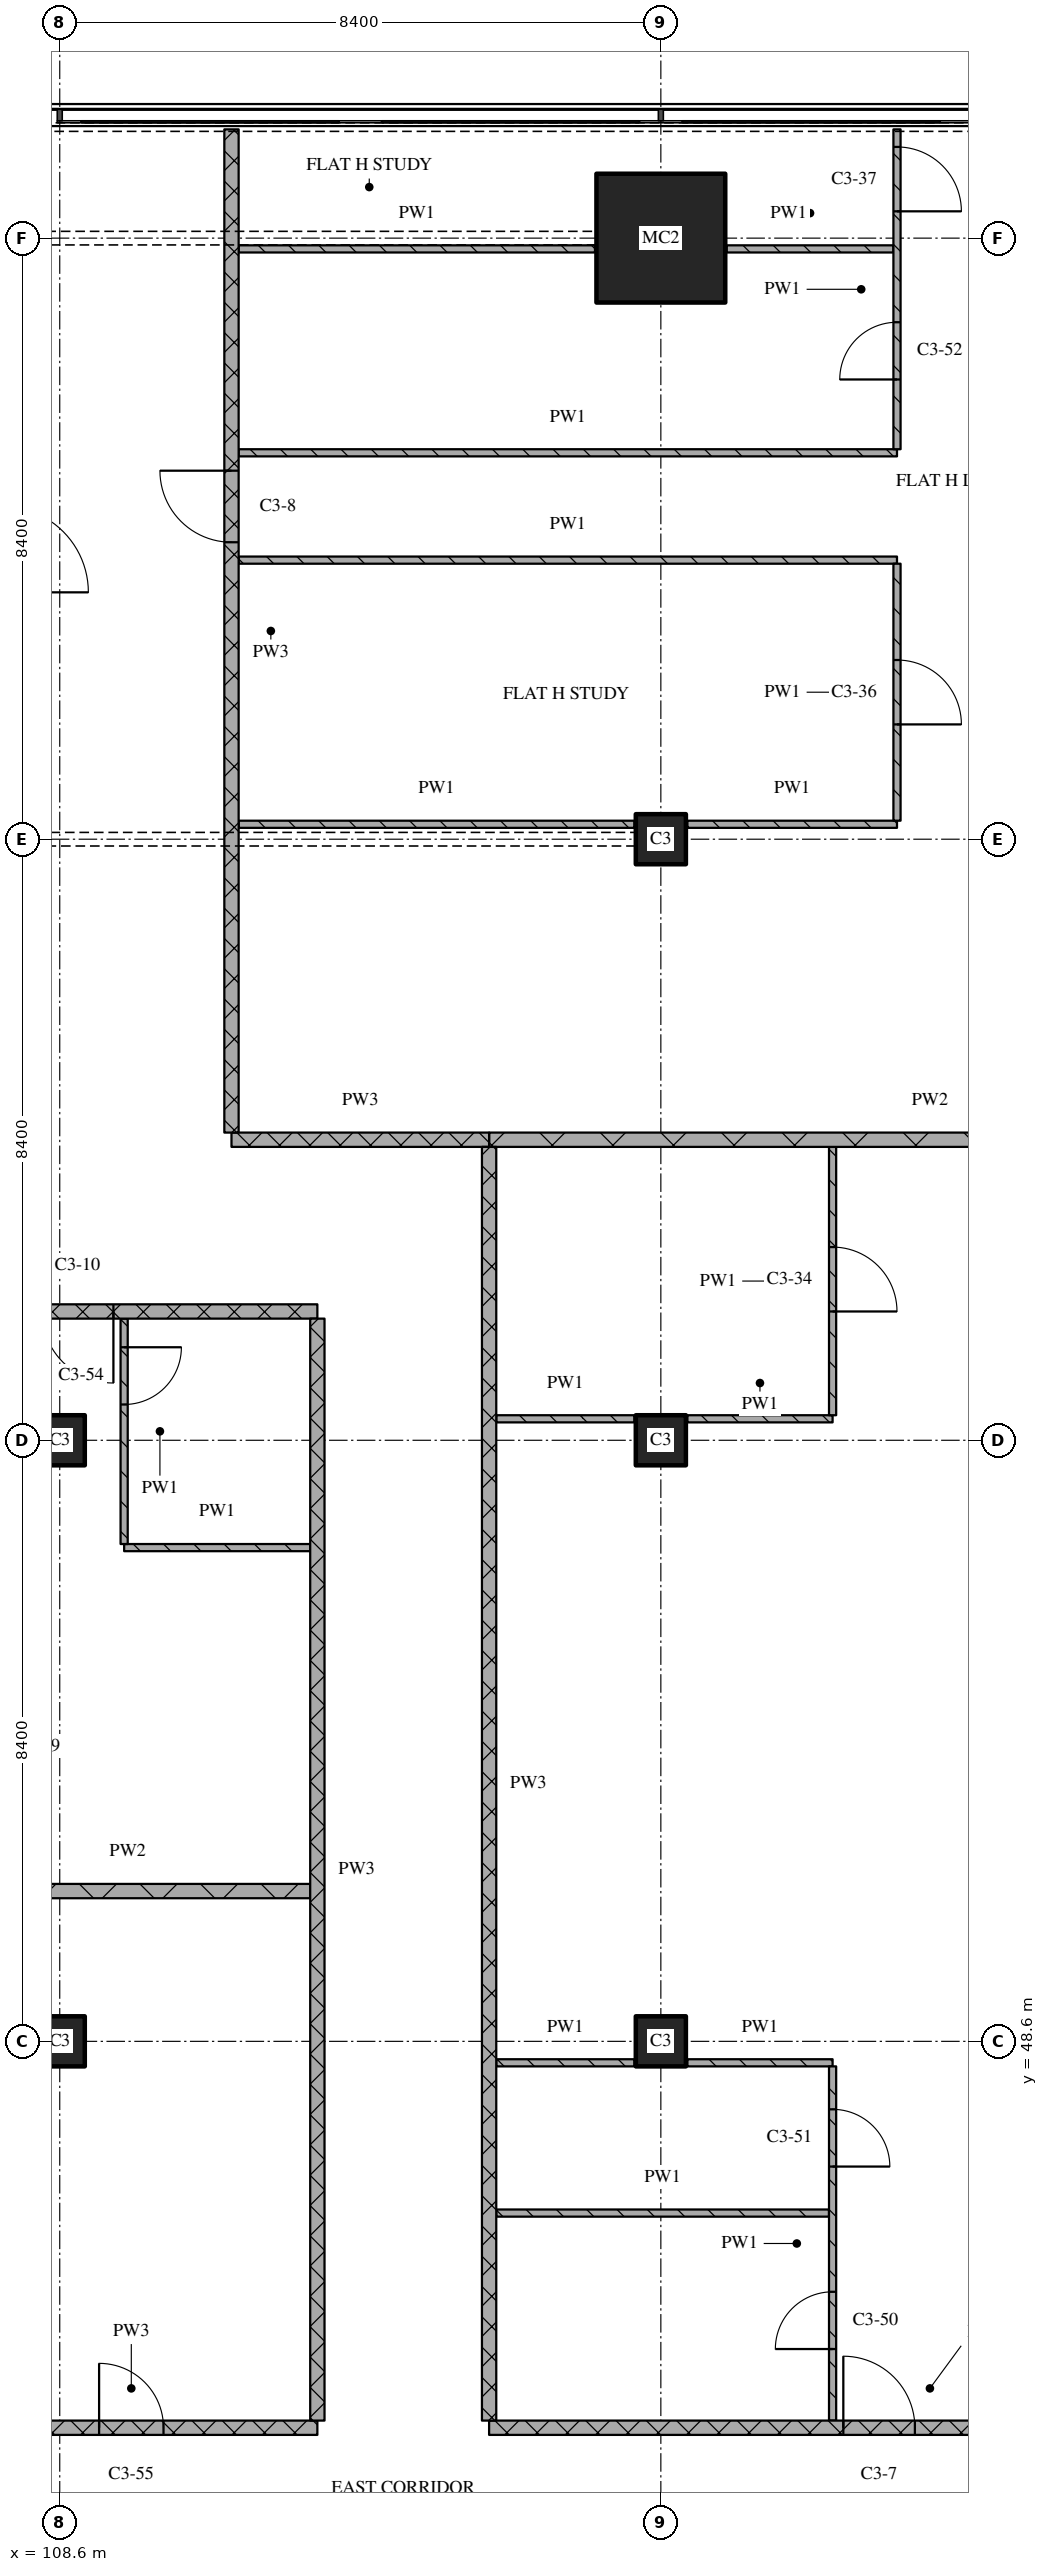
"""IFC4 building model, lengths in metres.
Left out: names, types, materials, properties, quantities, classifications, styles, units other than length and angle.
Written with IfcOpenShell. Run it as: python <this file> out.ifc"""

import sys

from ifc_helpers import new_model, si_unit, direction, frame, frame_2d, origin, origin_2d, place, context, subcontext, project, spatial, rectangle, extrude, element, fill, save


model = new_model("IFC4")
c1 = context("Model", 3, precision=1e-05, world=origin(), true_north=direction((0.0, 1.0)))
c2 = subcontext(c1, "Body", "Model", "MODEL_VIEW")
j1 = project(units=[si_unit("LENGTHUNIT", "METRE"), si_unit("PLANEANGLEUNIT", "RADIAN")], contexts=[c1])
p1 = place(None, origin())
s1 = spatial("IfcSite", under=j1, at=p1, CompositionType="ELEMENT")
p2 = place(p1, origin())
s2 = spatial("IfcBuilding", under=s1, at=p2, CompositionType="ELEMENT")
p3 = place(p2, frame((0.0, 0.0, 176.25)))
s3 = spatial("IfcBuildingStorey", under=s2, at=p3, CompositionType="ELEMENT", Elevation=176.25)
for number, where, z_axis, x_axis in (
    (1, (108.6, 48.6, 0.0), (0.0, 0.0, 1.0), (1.0, 0.0, 0.0)),
    (2, (108.6, 57.0, 0.0), (0.0, 0.0, 1.0), (1.0, 0.0, 0.0)),
    (3, (117.0, 48.6, 0.0), (0.0, 0.0, 1.0), (1.0, 0.0, 0.0)),
    (4, (117.0, 57.0, 0.0), (0.0, 0.0, 1.0), (1.0, 0.0, 0.0)),
    (5, (117.0, 65.4, 0.0), (0.0, 0.0, 1.0), (1.0, 0.0, 0.0)),
):
    element("IfcColumn", number, at=place(p3, frame(where, z_axis=z_axis, x_axis=x_axis)), inside=s3, PredefinedType="COLUMN", context=c2, shape_type="SweptSolid", body=[
        extrude(rectangle(XDim=0.7, YDim=0.7, at=origin_2d()), origin(), (0.0, 0.0, 1.0), 3.6),
    ])
p4 = place(p3, frame((117.0, 73.8, 0.0), z_axis=(0.0, 0.0, 1.0), x_axis=(1.0, 0.0, 0.0)))
e6 = element("IfcColumn", 6, at=p4, inside=s3, PredefinedType="COLUMN", context=c2, shape_type="SweptSolid", body=[
    extrude(rectangle(XDim=1.8, YDim=1.8, at=origin_2d()), origin(), (0.0, 0.0, 1.0), 3.6),
])
p5 = place(p3, frame((107.0, 43.2, 0.0), z_axis=(0.0, 0.0, 1.0), x_axis=(1.0, 0.0, 0.0)))
e7 = element("IfcWall", 7, at=p5, inside=s3, PredefinedType="PARTITIONING", context=c2, shape_type="SweptSolid", body=[
    extrude(rectangle(XDim=5.2, YDim=0.2, at=frame_2d((2.6, 0.0))), origin(), (0.0, 0.0, 1.0), 3.32),
])
p6 = place(p5, frame((2.15, 0.0, 0.0)))
e8 = element("IfcOpeningElement", 8, at=p6, cuts=e7, PredefinedType="OPENING", context=c2, shape_type="SweptSolid", body=[
    extrude(rectangle(XDim=0.9, YDim=2.1, at=frame_2d((0.45, 1.05))), frame((0.0, 0.11, 0.0), z_axis=(0.0, -1.0, 0.0), x_axis=(1.0, 0.0, 0.0)), (0.0, 0.0, 1.0), 0.22),
])
p7 = place(p3, frame((114.6, 43.2, 0.0), z_axis=(0.0, 0.0, 1.0), x_axis=(1.0, 0.0, 0.0)))
e9 = element("IfcWall", 9, at=p7, inside=s3, PredefinedType="PARTITIONING", context=c2, shape_type="SweptSolid", body=[
    extrude(rectangle(XDim=12.32, YDim=0.2, at=frame_2d((6.16, 0.0))), origin(), (0.0, 0.0, 1.0), 3.32),
])
p8 = place(p7, frame((4.95, 0.0, 0.0)))
e10 = element("IfcOpeningElement", 10, at=p8, cuts=e9, PredefinedType="OPENING", context=c2, shape_type="SweptSolid", body=[
    extrude(rectangle(XDim=1.0, YDim=2.1, at=frame_2d((0.5, 1.05))), frame((0.0, 0.11, 0.0), z_axis=(0.0, -1.0, 0.0), x_axis=(1.0, 0.0, 0.0)), (0.0, 0.0, 1.0), 0.22),
])
p9 = place(p3, frame((114.7, 46.2, 0.0), z_axis=(0.0, 0.0, 1.0), x_axis=(1.0, 0.0, 0.0)))
e11 = element("IfcWall", 11, at=p9, inside=s3, PredefinedType="PARTITIONING", context=c2, shape_type="SweptSolid", body=[
    extrude(rectangle(XDim=4.65, YDim=0.1, at=frame_2d((2.325, 0.0))), origin(), (0.0, 0.0, 1.0), 3.32),
])
p10 = place(p3, frame((114.7, 48.3, 0.0), z_axis=(0.0, 0.0, 1.0), x_axis=(1.0, 0.0, 0.0)))
e12 = element("IfcWall", 12, at=p10, inside=s3, PredefinedType="PARTITIONING", context=c2, shape_type="SweptSolid", body=[
    extrude(rectangle(XDim=1.93, YDim=0.1, at=frame_2d((0.965, 0.0))), origin(), (0.0, 0.0, 1.0), 3.32),
])
p11 = place(p3, frame((117.37, 48.3, 0.0), z_axis=(0.0, 0.0, 1.0), x_axis=(1.0, 0.0, 0.0)))
e13 = element("IfcWall", 13, at=p11, inside=s3, PredefinedType="PARTITIONING", context=c2, shape_type="SweptSolid", body=[
    extrude(rectangle(XDim=2.03, YDim=0.1, at=frame_2d((1.015, 0.0))), origin(), (0.0, 0.0, 1.0), 3.32),
])
p12 = place(p3, frame((107.0, 50.7, 0.0), z_axis=(0.0, 0.0, 1.0), x_axis=(1.0, 0.0, 0.0)))
e14 = element("IfcWall", 14, at=p12, inside=s3, PredefinedType="PARTITIONING", context=c2, shape_type="SweptSolid", body=[
    extrude(rectangle(XDim=5.1, YDim=0.2, at=frame_2d((2.55, 0.0))), origin(), (0.0, 0.0, 1.0), 3.32),
])
p13 = place(p3, frame((109.5, 55.5, 0.0), z_axis=(0.0, 0.0, 1.0), x_axis=(1.0, 0.0, 0.0)))
e15 = element("IfcWall", 15, at=p13, inside=s3, PredefinedType="PARTITIONING", context=c2, shape_type="SweptSolid", body=[
    extrude(rectangle(XDim=2.6, YDim=0.1, at=frame_2d((1.3, 0.0))), origin(), (0.0, 0.0, 1.0), 3.32),
])
p14 = place(p3, frame((114.7, 57.3, 0.0), z_axis=(0.0, 0.0, 1.0), x_axis=(1.0, 0.0, 0.0)))
e16 = element("IfcWall", 16, at=p14, inside=s3, PredefinedType="PARTITIONING", context=c2, shape_type="SweptSolid", body=[
    extrude(rectangle(XDim=1.93, YDim=0.1, at=frame_2d((0.965, 0.0))), origin(), (0.0, 0.0, 1.0), 3.32),
])
p15 = place(p3, frame((117.37, 57.3, 0.0), z_axis=(0.0, 0.0, 1.0), x_axis=(1.0, 0.0, 0.0)))
e17 = element("IfcWall", 17, at=p15, inside=s3, PredefinedType="PARTITIONING", context=c2, shape_type="SweptSolid", body=[
    extrude(rectangle(XDim=2.03, YDim=0.1, at=frame_2d((1.015, 0.0))), origin(), (0.0, 0.0, 1.0), 3.32),
])
p16 = place(p3, frame((112.2, 58.8, 0.0), z_axis=(0.0, 0.0, 1.0), x_axis=(-1.0, 0.0, 0.0)))
e18 = element("IfcWall", 18, at=p16, inside=s3, PredefinedType="PARTITIONING", context=c2, shape_type="SweptSolid", body=[
    extrude(rectangle(XDim=10.8, YDim=0.2, at=frame_2d((5.4, 0.0))), origin(), (0.0, 0.0, 1.0), 3.32),
])
p17 = place(p16, frame((2.85, 0.0, 0.0)))
e19 = element("IfcOpeningElement", 19, at=p17, cuts=e18, PredefinedType="OPENING", context=c2, shape_type="SweptSolid", body=[
    extrude(rectangle(XDim=1.0, YDim=2.1, at=frame_2d((0.5, 1.05))), frame((0.0, 0.11, 0.0), z_axis=(0.0, -1.0, 0.0), x_axis=(1.0, 0.0, 0.0)), (0.0, 0.0, 1.0), 0.22),
])
p18 = place(p3, frame((111.0, 61.2, 0.0), z_axis=(0.0, 0.0, 1.0), x_axis=(1.0, 0.0, 0.0)))
e20 = element("IfcWall", 20, at=p18, inside=s3, PredefinedType="PARTITIONING", context=c2, shape_type="SweptSolid", body=[
    extrude(rectangle(XDim=3.6, YDim=0.2, at=frame_2d((1.8, 0.0))), origin(), (0.0, 0.0, 1.0), 3.32),
])
p19 = place(p3, frame((114.6, 61.2, 0.0), z_axis=(0.0, 0.0, 1.0), x_axis=(1.0, 0.0, 0.0)))
e21 = element("IfcWall", 21, at=p19, inside=s3, PredefinedType="PARTITIONING", context=c2, shape_type="SweptSolid", body=[
    extrude(rectangle(XDim=12.32, YDim=0.2, at=frame_2d((6.16, 0.0))), origin(), (0.0, 0.0, 1.0), 3.32),
])
p20 = place(p3, frame((111.1, 65.609, 0.0), z_axis=(0.0, 0.0, 1.0), x_axis=(1.0, 0.0, 0.0)))
e22 = element("IfcWall", 22, at=p20, inside=s3, PredefinedType="PARTITIONING", context=c2, shape_type="SweptSolid", body=[
    extrude(rectangle(XDim=5.53, YDim=0.1, at=frame_2d((2.765, 0.0))), origin(), (0.0, 0.0, 1.0), 3.32),
])
p21 = place(p3, frame((117.37, 65.609, 0.0), z_axis=(0.0, 0.0, 1.0), x_axis=(1.0, 0.0, 0.0)))
e23 = element("IfcWall", 23, at=p21, inside=s3, PredefinedType="PARTITIONING", context=c2, shape_type="SweptSolid", body=[
    extrude(rectangle(XDim=2.93, YDim=0.1, at=frame_2d((1.465, 0.0))), origin(), (0.0, 0.0, 1.0), 3.32),
])
for number, where, z_axis, x_axis in (
    (24, (111.1, 69.3, 0.0), (0.0, 0.0, 1.0), (1.0, 0.0, 0.0)),
    (25, (111.1, 70.8, 0.0), (0.0, 0.0, 1.0), (1.0, 0.0, 0.0)),
):
    element("IfcWall", number, at=place(p3, frame(where, z_axis=z_axis, x_axis=x_axis)), inside=s3, PredefinedType="PARTITIONING", context=c2, shape_type="SweptSolid", body=[
        extrude(rectangle(XDim=9.2, YDim=0.1, at=frame_2d((4.6, 0.0))), origin(), (0.0, 0.0, 1.0), 3.32),
    ])
p22 = place(p3, frame((111.1, 73.649, 0.0), z_axis=(0.0, 0.0, 1.0), x_axis=(1.0, 0.0, 0.0)))
e26 = element("IfcWall", 26, at=p22, inside=s3, PredefinedType="PARTITIONING", context=c2, shape_type="SweptSolid", body=[
    extrude(rectangle(XDim=4.98, YDim=0.1, at=frame_2d((2.49, 0.0))), origin(), (0.0, 0.0, 1.0), 3.32),
])
p23 = place(p3, frame((117.92, 73.649, 0.0), z_axis=(0.0, 0.0, 1.0), x_axis=(1.0, 0.0, 0.0)))
e27 = element("IfcWall", 27, at=p23, inside=s3, PredefinedType="PARTITIONING", context=c2, shape_type="SweptSolid", body=[
    extrude(rectangle(XDim=2.33, YDim=0.1, at=frame_2d((1.165, 0.0))), origin(), (0.0, 0.0, 1.0), 3.32),
])
p24 = place(p3, frame((109.5, 58.7, 0.0), z_axis=(0.0, 0.0, 1.0), x_axis=(0.0, -1.0, 0.0)))
e28 = element("IfcWall", 28, at=p24, inside=s3, PredefinedType="PARTITIONING", context=c2, shape_type="SweptSolid", body=[
    extrude(rectangle(XDim=3.15, YDim=0.1, at=frame_2d((1.575, 0.0))), origin(), (0.0, 0.0, 1.0), 3.32),
])
p25 = place(p24, frame((0.4, 0.0, 0.0)))
e29 = element("IfcOpeningElement", 29, at=p25, cuts=e28, PredefinedType="OPENING", context=c2, shape_type="SweptSolid", body=[
    extrude(rectangle(XDim=0.8, YDim=2.1, at=frame_2d((0.4, 1.05))), frame((0.0, 0.06, 0.0), z_axis=(0.0, -1.0, 0.0), x_axis=(1.0, 0.0, 0.0)), (0.0, 0.0, 1.0), 0.12),
])
p26 = place(p3, frame((111.0, 75.32, 0.0), z_axis=(0.0, 0.0, 1.0), x_axis=(0.0, -1.0, 0.0)))
e30 = element("IfcWall", 30, at=p26, inside=s3, PredefinedType="PARTITIONING", context=c2, shape_type="SweptSolid", body=[
    extrude(rectangle(XDim=14.02, YDim=0.2, at=frame_2d((7.01, 0.0))), origin(), (0.0, 0.0, 1.0), 3.32),
])
p27 = place(p26, frame((4.77, 0.0, 0.0)))
e31 = element("IfcOpeningElement", 31, at=p27, cuts=e30, PredefinedType="OPENING", context=c2, shape_type="SweptSolid", body=[
    extrude(rectangle(XDim=1.0, YDim=2.1, at=frame_2d((0.5, 1.05))), frame((0.0, 0.11, 0.0), z_axis=(0.0, -1.0, 0.0), x_axis=(1.0, 0.0, 0.0)), (0.0, 0.0, 1.0), 0.22),
])
p28 = place(p3, frame((112.2, 58.7, 0.0), z_axis=(0.0, 0.0, 1.0), x_axis=(0.0, -1.0, 0.0)))
e32 = element("IfcWall", 32, at=p28, inside=s3, PredefinedType="PARTITIONING", context=c2, shape_type="SweptSolid", body=[
    extrude(rectangle(XDim=15.4, YDim=0.2, at=frame_2d((7.7, 0.0))), origin(), (0.0, 0.0, 1.0), 3.32),
])
p29 = place(p3, frame((114.6, 61.1, 0.0), z_axis=(0.0, 0.0, 1.0), x_axis=(0.0, -1.0, 0.0)))
e33 = element("IfcWall", 33, at=p29, inside=s3, PredefinedType="PARTITIONING", context=c2, shape_type="SweptSolid", body=[
    extrude(rectangle(XDim=17.8, YDim=0.2, at=frame_2d((8.9, 0.0))), origin(), (0.0, 0.0, 1.0), 3.32),
])
p30 = place(p3, frame((119.4, 43.3, 0.0), z_axis=(0.0, 0.0, 1.0), x_axis=(0.0, 1.0, 0.0)))
e34 = element("IfcWall", 34, at=p30, inside=s3, PredefinedType="PARTITIONING", context=c2, shape_type="SweptSolid", body=[
    extrude(rectangle(XDim=4.95, YDim=0.1, at=frame_2d((2.475, 0.0))), origin(), (0.0, 0.0, 1.0), 3.32),
])
p31 = place(p30, frame((1.0, 0.0, 0.0)))
e35 = element("IfcOpeningElement", 35, at=p31, cuts=e34, PredefinedType="OPENING", context=c2, shape_type="SweptSolid", body=[
    extrude(rectangle(XDim=0.8, YDim=2.1, at=frame_2d((0.4, 1.05))), frame((0.0, 0.06, 0.0), z_axis=(0.0, -1.0, 0.0), x_axis=(1.0, 0.0, 0.0)), (0.0, 0.0, 1.0), 0.12),
])
p32 = place(p30, frame((3.55, 0.0, 0.0)))
e36 = element("IfcOpeningElement", 36, at=p32, cuts=e34, PredefinedType="OPENING", context=c2, shape_type="SweptSolid", body=[
    extrude(rectangle(XDim=0.8, YDim=2.1, at=frame_2d((0.4, 1.05))), frame((0.0, 0.06, 0.0), z_axis=(0.0, -1.0, 0.0), x_axis=(1.0, 0.0, 0.0)), (0.0, 0.0, 1.0), 0.12),
])
p33 = place(p3, frame((119.4, 57.35, 0.0), z_axis=(0.0, 0.0, 1.0), x_axis=(0.0, 1.0, 0.0)))
e37 = element("IfcWall", 37, at=p33, inside=s3, PredefinedType="PARTITIONING", context=c2, shape_type="SweptSolid", body=[
    extrude(rectangle(XDim=3.75, YDim=0.1, at=frame_2d((1.875, 0.0))), origin(), (0.0, 0.0, 1.0), 3.32),
])
p34 = place(p33, frame((1.45, 0.0, 0.0)))
e38 = element("IfcOpeningElement", 38, at=p34, cuts=e37, PredefinedType="OPENING", context=c2, shape_type="SweptSolid", body=[
    extrude(rectangle(XDim=0.9, YDim=2.1, at=frame_2d((0.45, 1.05))), frame((0.0, 0.06, 0.0), z_axis=(0.0, -1.0, 0.0), x_axis=(1.0, 0.0, 0.0)), (0.0, 0.0, 1.0), 0.12),
])
p35 = place(p3, frame((120.3, 65.659, 0.0), z_axis=(0.0, 0.0, 1.0), x_axis=(0.0, 1.0, 0.0)))
e39 = element("IfcWall", 39, at=p35, inside=s3, PredefinedType="PARTITIONING", context=c2, shape_type="SweptSolid", body=[
    extrude(rectangle(XDim=3.591, YDim=0.1, at=frame_2d((1.796, 0.0))), origin(), (0.0, 0.0, 1.0), 3.32),
])
p36 = place(p35, frame((1.346, 0.0, 0.0)))
e40 = element("IfcOpeningElement", 40, at=p36, cuts=e39, PredefinedType="OPENING", context=c2, shape_type="SweptSolid", body=[
    extrude(rectangle(XDim=0.9, YDim=2.1, at=frame_2d((0.45, 1.05))), frame((0.0, 0.06, 0.0), z_axis=(0.0, -1.0, 0.0), x_axis=(1.0, 0.0, 0.0)), (0.0, 0.0, 1.0), 0.12),
])
p37 = place(p3, frame((120.3, 70.85, 0.0), z_axis=(0.0, 0.0, 1.0), x_axis=(0.0, 1.0, 0.0)))
e41 = element("IfcWall", 41, at=p37, inside=s3, PredefinedType="PARTITIONING", context=c2, shape_type="SweptSolid", body=[
    extrude(rectangle(XDim=4.47, YDim=0.1, at=frame_2d((2.235, 0.0))), origin(), (0.0, 0.0, 1.0), 3.32),
])
p38 = place(p37, frame((0.975, 0.0, 0.0)))
e42 = element("IfcOpeningElement", 42, at=p38, cuts=e41, PredefinedType="OPENING", context=c2, shape_type="SweptSolid", body=[
    extrude(rectangle(XDim=0.8, YDim=2.1, at=frame_2d((0.4, 1.05))), frame((0.0, 0.06, 0.0), z_axis=(0.0, -1.0, 0.0), x_axis=(1.0, 0.0, 0.0)), (0.0, 0.0, 1.0), 0.12),
])
p39 = place(p37, frame((3.325, 0.0, 0.0)))
e43 = element("IfcOpeningElement", 43, at=p39, cuts=e41, PredefinedType="OPENING", context=c2, shape_type="SweptSolid", body=[
    extrude(rectangle(XDim=0.9, YDim=2.1, at=frame_2d((0.45, 1.05))), frame((0.0, 0.06, 0.0), z_axis=(0.0, -1.0, 0.0), x_axis=(1.0, 0.0, 0.0)), (0.0, 0.0, 1.0), 0.12),
])
p40 = place(p6, origin())
e44 = element("IfcDoor", 44, at=p40, inside=s3, OperationType="SINGLE_SWING_LEFT", PredefinedType="DOOR", context=c2, shape_type="SweptSolid", body=[
    extrude(rectangle(XDim=0.9, YDim=2.1, at=frame_2d((0.45, 1.05))), frame((0.0, 0.025, 0.0), z_axis=(0.0, -1.0, 0.0), x_axis=(1.0, 0.0, 0.0)), (0.0, 0.0, 1.0), 0.05),
])
fill(e8, e44)
p41 = place(p8, origin())
e45 = element("IfcDoor", 45, at=p41, inside=s3, OperationType="SINGLE_SWING_LEFT", PredefinedType="DOOR", context=c2, shape_type="SweptSolid", body=[
    extrude(rectangle(XDim=1.0, YDim=2.1, at=frame_2d((0.5, 1.05))), frame((0.0, 0.025, 0.0), z_axis=(0.0, -1.0, 0.0), x_axis=(1.0, 0.0, 0.0)), (0.0, 0.0, 1.0), 0.05),
])
fill(e10, e45)
p42 = place(p17, origin())
e46 = element("IfcDoor", 46, at=p42, inside=s3, OperationType="SINGLE_SWING_LEFT", PredefinedType="DOOR", context=c2, shape_type="SweptSolid", body=[
    extrude(rectangle(XDim=1.0, YDim=2.1, at=frame_2d((0.5, 1.05))), frame((0.0, 0.025, 0.0), z_axis=(0.0, -1.0, 0.0), x_axis=(1.0, 0.0, 0.0)), (0.0, 0.0, 1.0), 0.05),
])
fill(e19, e46)
p43 = place(p25, origin())
e47 = element("IfcDoor", 47, at=p43, inside=s3, OperationType="SINGLE_SWING_LEFT", PredefinedType="DOOR", context=c2, shape_type="SweptSolid", body=[
    extrude(rectangle(XDim=0.8, YDim=2.1, at=frame_2d((0.4, 1.05))), frame((0.0, 0.025, 0.0), z_axis=(0.0, -1.0, 0.0), x_axis=(1.0, 0.0, 0.0)), (0.0, 0.0, 1.0), 0.05),
])
fill(e29, e47)
p44 = place(p27, origin())
e48 = element("IfcDoor", 48, at=p44, inside=s3, OperationType="SINGLE_SWING_RIGHT", PredefinedType="DOOR", context=c2, shape_type="SweptSolid", body=[
    extrude(rectangle(XDim=1.0, YDim=2.1, at=frame_2d((0.5, 1.05))), frame((0.0, 0.025, 0.0), z_axis=(0.0, -1.0, 0.0), x_axis=(1.0, 0.0, 0.0)), (0.0, 0.0, 1.0), 0.05),
])
fill(e31, e48)
p45 = place(p31, origin())
e49 = element("IfcDoor", 49, at=p45, inside=s3, OperationType="SINGLE_SWING_LEFT", PredefinedType="DOOR", context=c2, shape_type="SweptSolid", body=[
    extrude(rectangle(XDim=0.8, YDim=2.1, at=frame_2d((0.4, 1.05))), frame((0.0, 0.025, 0.0), z_axis=(0.0, -1.0, 0.0), x_axis=(1.0, 0.0, 0.0)), (0.0, 0.0, 1.0), 0.05),
])
fill(e35, e49)
p46 = place(p32, origin())
e50 = element("IfcDoor", 50, at=p46, inside=s3, OperationType="SINGLE_SWING_RIGHT", PredefinedType="DOOR", context=c2, shape_type="SweptSolid", body=[
    extrude(rectangle(XDim=0.8, YDim=2.1, at=frame_2d((0.4, 1.05))), frame((0.0, 0.025, 0.0), z_axis=(0.0, -1.0, 0.0), x_axis=(1.0, 0.0, 0.0)), (0.0, 0.0, 1.0), 0.05),
])
fill(e36, e50)
p47 = place(p34, origin())
e51 = element("IfcDoor", 51, at=p47, inside=s3, OperationType="SINGLE_SWING_RIGHT", PredefinedType="DOOR", context=c2, shape_type="SweptSolid", body=[
    extrude(rectangle(XDim=0.9, YDim=2.1, at=frame_2d((0.45, 1.05))), frame((0.0, 0.025, 0.0), z_axis=(0.0, -1.0, 0.0), x_axis=(1.0, 0.0, 0.0)), (0.0, 0.0, 1.0), 0.05),
])
fill(e38, e51)
p48 = place(p36, origin())
e52 = element("IfcDoor", 52, at=p48, inside=s3, OperationType="SINGLE_SWING_RIGHT", PredefinedType="DOOR", context=c2, shape_type="SweptSolid", body=[
    extrude(rectangle(XDim=0.9, YDim=2.1, at=frame_2d((0.45, 1.05))), frame((0.0, 0.025, 0.0), z_axis=(0.0, -1.0, 0.0), x_axis=(1.0, 0.0, 0.0)), (0.0, 0.0, 1.0), 0.05),
])
fill(e40, e52)
p49 = place(p38, origin())
e53 = element("IfcDoor", 53, at=p49, inside=s3, OperationType="SINGLE_SWING_LEFT", PredefinedType="DOOR", context=c2, shape_type="SweptSolid", body=[
    extrude(rectangle(XDim=0.8, YDim=2.1, at=frame_2d((0.4, 1.05))), frame((0.0, 0.025, 0.0), z_axis=(0.0, -1.0, 0.0), x_axis=(1.0, 0.0, 0.0)), (0.0, 0.0, 1.0), 0.05),
])
fill(e42, e53)
p50 = place(p39, origin())
e54 = element("IfcDoor", 54, at=p50, inside=s3, OperationType="SINGLE_SWING_RIGHT", PredefinedType="DOOR", context=c2, shape_type="SweptSolid", body=[
    extrude(rectangle(XDim=0.9, YDim=2.1, at=frame_2d((0.45, 1.05))), frame((0.0, 0.025, 0.0), z_axis=(0.0, -1.0, 0.0), x_axis=(1.0, 0.0, 0.0)), (0.0, 0.0, 1.0), 0.05),
])
fill(e43, e54)
save(model, sys.argv[1])
